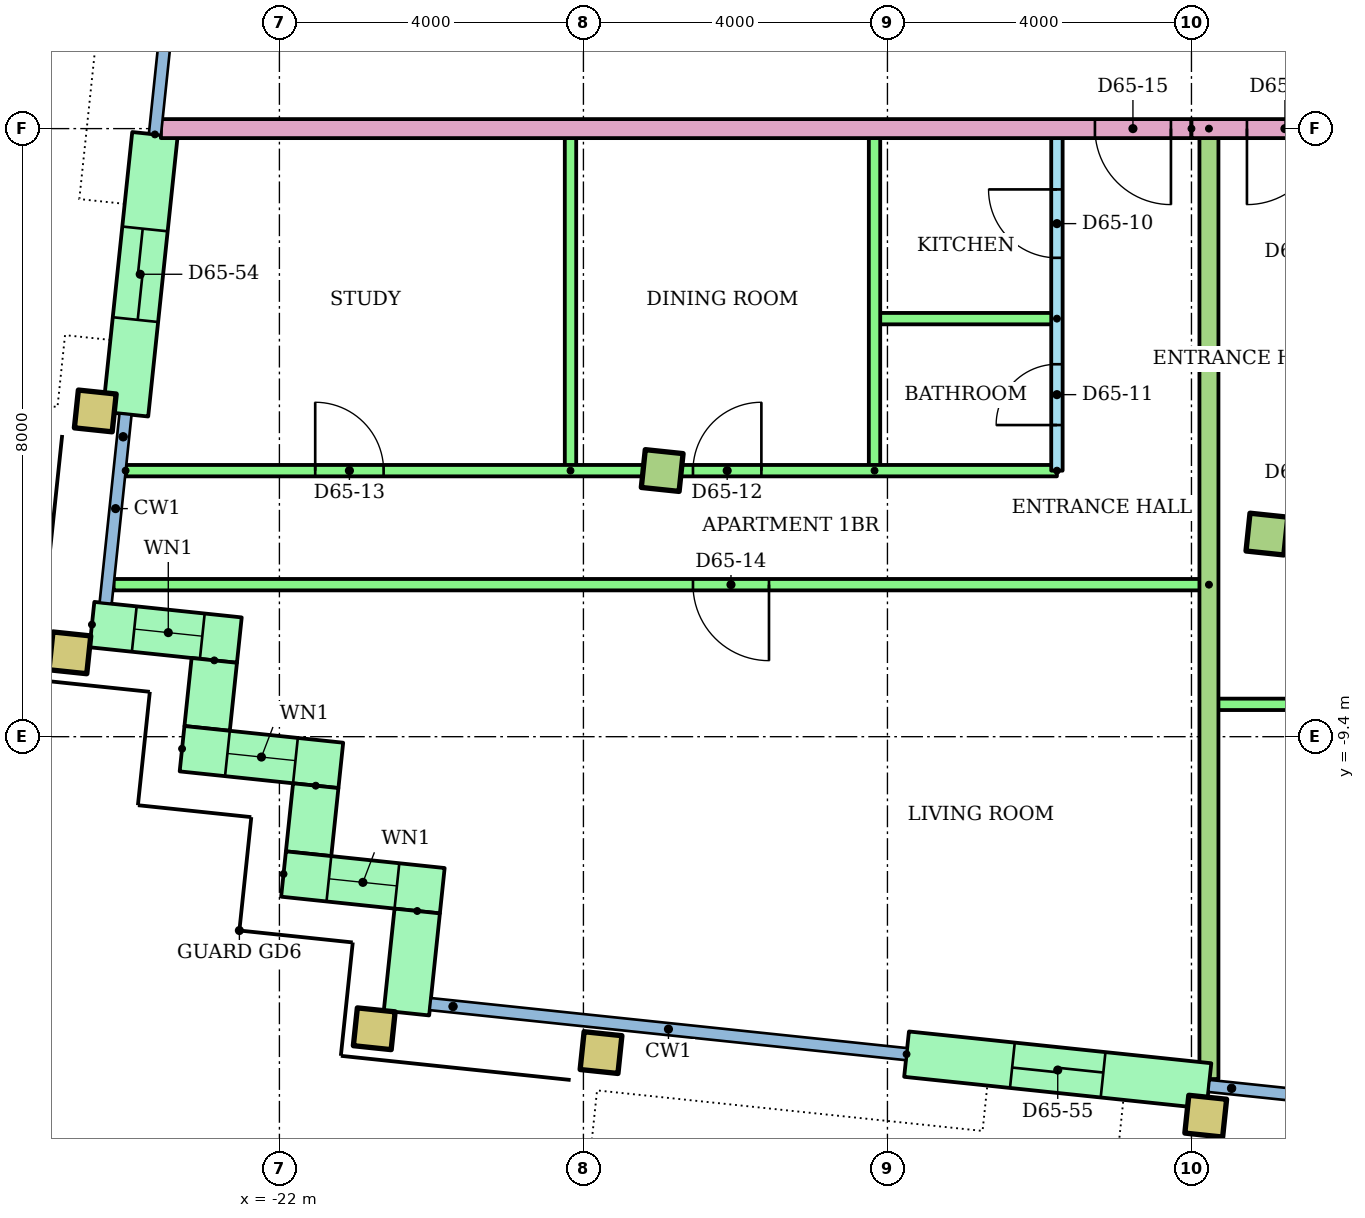
"""IFC4 building model, lengths in metres.
Left out: names, types, materials, properties, quantities, classifications, styles, units other than length and angle.
Written with IfcOpenShell. Run it as: python <this file> out.ifc"""

import sys

from ifc_helpers import new_model, si_unit, direction, frame, frame_2d, origin, origin_2d, place, context, subcontext, project, spatial, rectangle, hollow_rectangle, extrude, element, fill, save


model = new_model("IFC4")
c1 = context("Model", 3, precision=1e-05, world=origin(), true_north=direction((0.0, 1.0)))
c2 = subcontext(c1, "Body", "Model", "MODEL_VIEW")
j1 = project(units=[si_unit("LENGTHUNIT", "METRE"), si_unit("PLANEANGLEUNIT", "RADIAN")], contexts=[c1])
p1 = place(None, origin())
s1 = spatial("IfcSite", under=j1, at=p1, CompositionType="ELEMENT")
p2 = place(p1, origin())
s2 = spatial("IfcBuilding", under=s1, at=p2, CompositionType="ELEMENT")
p3 = place(p2, frame((0.0, 0.0, 253.1)))
s3 = spatial("IfcBuildingStorey", under=s2, at=p3, CompositionType="ELEMENT", Elevation=253.1)
for number, where, z_axis, x_axis in (
    (1, (-20.752, -13.243, 0.0), (0.0, 0.0, 1.0), (0.995, -0.105, 0.0)),
    (2, (-17.768, -13.556, 0.0), (0.0, 0.0, 1.0), (0.995, -0.105, 0.0)),
    (3, (-9.812, -14.392, 0.0), (0.0, 0.0, 1.0), (0.995, -0.105, 0.0)),
    (4, (-24.757, -8.297, 0.0), (0.0, 0.0, 1.0), (0.995, -0.105, 0.0)),
    (5, (-24.423, -5.115, 0.0), (0.0, 0.0, 1.0), (0.995, -0.105, 0.0)),
):
    element("IfcColumn", number, at=place(p3, frame(where, z_axis=z_axis, x_axis=x_axis)), inside=s3, PredefinedType="COLUMN", context=c2, shape_type="SweptSolid", body=[
        extrude(hollow_rectangle(XDim=0.5, YDim=0.5, WallThickness=0.025, at=origin_2d()), origin(), (0.0, 0.0, 1.0), 3.2),
    ])
for number, where, z_axis, x_axis in (
    (6, (-16.964, -5.898, 0.0), (0.0, 0.0, 1.0), (0.995, -0.105, 0.0)),
    (7, (-9.007, -6.735, 0.0), (0.0, 0.0, 1.0), (0.995, -0.105, 0.0)),
):
    element("IfcColumn", number, at=place(p3, frame(where, z_axis=z_axis, x_axis=x_axis)), inside=s3, PredefinedType="COLUMN", context=c2, shape_type="SweptSolid", body=[
        extrude(rectangle(XDim=0.5, YDim=0.5, at=origin_2d()), origin(), (0.0, 0.0, 1.0), 3.2),
    ])
p4 = place(p3, frame((-23.638, -1.476, 0.0), z_axis=(0.0, 0.0, 1.0), x_axis=(-0.104513052986, -0.994523514933, 0.0)))
e8 = element("IfcWall", 8, at=p4, inside=s3, PredefinedType="STANDARD", context=c2, shape_type="SweptSolid", body=[
    extrude(rectangle(XDim=3.7, YDim=0.6, at=frame_2d((1.85, 0.0))), origin(), (0.0, 0.0, 1.0), 2.92),
])
p5 = place(p4, frame((1.25, 0.0, 0.0)))
e9 = element("IfcOpeningElement", 9, at=p5, cuts=e8, PredefinedType="OPENING", context=c2, shape_type="SweptSolid", body=[
    extrude(rectangle(XDim=1.2, YDim=2.1, at=frame_2d((0.6, 1.05))), frame((0.0, 0.31, 0.0), z_axis=(0.0, -1.0, 0.0), x_axis=(1.0, 0.0, 0.0)), (0.0, 0.0, 1.0), 0.62),
])
p6 = place(p3, frame((-24.467, -7.925, 0.0), z_axis=(0.0, 0.0, 1.0), x_axis=(0.994521219184, -0.104534896528, 0.0)))
e10 = element("IfcWall", 10, at=p6, inside=s3, PredefinedType="STANDARD", context=c2, shape_type="SweptSolid", body=[
    extrude(rectangle(XDim=1.95, YDim=0.6, at=frame_2d((0.975, 0.0))), origin(), (0.0, 0.0, 1.0), 2.92),
])
p7 = place(p6, frame((0.56, 0.0, 0.9)))
e11 = element("IfcOpeningElement", 11, at=p7, cuts=e10, PredefinedType="OPENING", context=c2, shape_type="SweptSolid", body=[
    extrude(rectangle(XDim=0.9, YDim=1.5, at=frame_2d((0.45, 0.75))), frame((0.0, 0.31, 0.0), z_axis=(0.0, -1.0, 0.0), x_axis=(1.0, 0.0, 0.0)), (0.0, 0.0, 1.0), 0.62),
])
p8 = place(p3, frame((-22.857, -8.396, 0.0), z_axis=(0.0, 0.0, 1.0), x_axis=(-0.104444712852, -0.994530694326, 0.0)))
e12 = element("IfcWall", 12, at=p8, inside=s3, PredefinedType="STANDARD", context=c2, shape_type="SweptSolid", body=[
    extrude(rectangle(XDim=0.9, YDim=0.6, at=frame_2d((0.45, 0.0))), origin(), (0.0, 0.0, 1.0), 2.92),
])
p9 = place(p3, frame((-23.281, -9.558, 0.0), z_axis=(0.0, 0.0, 1.0), x_axis=(0.994523910136, -0.104509292252, 0.0)))
e13 = element("IfcWall", 13, at=p9, inside=s3, PredefinedType="STANDARD", context=c2, shape_type="SweptSolid", body=[
    extrude(rectangle(XDim=2.1, YDim=0.6, at=frame_2d((1.05, 0.0))), origin(), (0.0, 0.0, 1.0), 2.92),
])
p10 = place(p9, frame((0.6, 0.0, 0.9)))
e14 = element("IfcOpeningElement", 14, at=p10, cuts=e13, PredefinedType="OPENING", context=c2, shape_type="SweptSolid", body=[
    extrude(rectangle(XDim=0.9, YDim=1.5, at=frame_2d((0.45, 0.75))), frame((0.0, 0.31, 0.0), z_axis=(0.0, -1.0, 0.0), x_axis=(1.0, 0.0, 0.0)), (0.0, 0.0, 1.0), 0.62),
])
p11 = place(p3, frame((-21.522, -10.044, 0.0), z_axis=(0.0, 0.0, 1.0), x_axis=(-0.104416541099, -0.994533652495, 0.0)))
e15 = element("IfcWall", 15, at=p11, inside=s3, PredefinedType="STANDARD", context=c2, shape_type="SweptSolid", body=[
    extrude(rectangle(XDim=0.9, YDim=0.6, at=frame_2d((0.45, 0.0))), origin(), (0.0, 0.0, 1.0), 2.92),
])
p12 = place(p3, frame((-21.946, -11.207, 0.0), z_axis=(0.0, 0.0, 1.0), x_axis=(0.994511820899, -0.104624271047, 0.0)))
e16 = element("IfcWall", 16, at=p12, inside=s3, PredefinedType="STANDARD", context=c2, shape_type="SweptSolid", body=[
    extrude(rectangle(XDim=2.1, YDim=0.6, at=frame_2d((1.05, 0.0))), origin(), (0.0, 0.0, 1.0), 2.92),
])
p13 = place(p12, frame((0.6, 0.0, 0.9)))
e17 = element("IfcOpeningElement", 17, at=p13, cuts=e16, PredefinedType="OPENING", context=c2, shape_type="SweptSolid", body=[
    extrude(rectangle(XDim=0.9, YDim=1.5, at=frame_2d((0.45, 0.75))), frame((0.0, 0.31, 0.0), z_axis=(0.0, -1.0, 0.0), x_axis=(1.0, 0.0, 0.0)), (0.0, 0.0, 1.0), 0.62),
])
p14 = place(p3, frame((-20.187, -11.693, 0.0), z_axis=(0.0, 0.0, 1.0), x_axis=(-0.1043365026, -0.994542052517, 0.0)))
e18 = element("IfcWall", 18, at=p14, inside=s3, PredefinedType="STANDARD", context=c2, shape_type="SweptSolid", body=[
    extrude(rectangle(XDim=1.35, YDim=0.6, at=frame_2d((0.675, 0.0))), origin(), (0.0, 0.0, 1.0), 2.92),
])
p15 = place(p3, frame((-13.749, -13.576, 0.0), z_axis=(0.0, 0.0, 1.0), x_axis=(0.994519156568, -0.104554517933, 0.0)))
e19 = element("IfcWall", 19, at=p15, inside=s3, PredefinedType="STANDARD", context=c2, shape_type="SweptSolid", body=[
    extrude(rectangle(XDim=4.0, YDim=0.6, at=frame_2d((2.0, 0.0))), origin(), (0.0, 0.0, 1.0), 2.92),
])
p16 = place(p15, frame((1.4, 0.0, 0.0)))
e20 = element("IfcOpeningElement", 20, at=p16, cuts=e19, PredefinedType="OPENING", context=c2, shape_type="SweptSolid", body=[
    extrude(rectangle(XDim=1.2, YDim=2.1, at=frame_2d((0.6, 1.05))), frame((0.0, 0.31, 0.0), z_axis=(0.0, -1.0, 0.0), x_axis=(1.0, 0.0, 0.0)), (0.0, 0.0, 1.0), 0.62),
])
p17 = place(p3, frame((-11.77, -5.9, 0.0), z_axis=(0.0, 0.0, 1.0), x_axis=(0.0, 1.0, 0.0)))
e21 = element("IfcWall", 21, at=p17, inside=s3, PredefinedType="PARTITIONING", context=c2, shape_type="SweptSolid", body=[
    extrude(rectangle(XDim=4.5, YDim=0.15, at=frame_2d((2.25, 0.0))), origin(), (0.0, 0.0, 1.0), 2.4),
])
p18 = place(p17, frame((2.8, 0.0, 0.0)))
e22 = element("IfcOpeningElement", 22, at=p18, cuts=e21, PredefinedType="OPENING", context=c2, shape_type="SweptSolid", body=[
    extrude(rectangle(XDim=0.9, YDim=2.1, at=frame_2d((0.45, 1.05))), frame((0.0, 0.085, 0.0), z_axis=(0.0, -1.0, 0.0), x_axis=(1.0, 0.0, 0.0)), (0.0, 0.0, 1.0), 0.17),
])
p19 = place(p17, frame((0.6, 0.0, 0.0)))
e23 = element("IfcOpeningElement", 23, at=p19, cuts=e21, PredefinedType="OPENING", context=c2, shape_type="SweptSolid", body=[
    extrude(rectangle(XDim=0.8, YDim=2.1, at=frame_2d((0.4, 1.05))), frame((0.0, 0.085, 0.0), z_axis=(0.0, -1.0, 0.0), x_axis=(1.0, 0.0, 0.0)), (0.0, 0.0, 1.0), 0.17),
])
p20 = place(p3, frame((-11.77, -3.9, 0.0), z_axis=(0.0, 0.0, 1.0), x_axis=(-1.0, 0.0, 0.0)))
e24 = element("IfcWall", 24, at=p20, inside=s3, PredefinedType="PARTITIONING", context=c2, shape_type="SweptSolid", body=[
    extrude(rectangle(XDim=2.4, YDim=0.15, at=frame_2d((1.2, 0.0))), origin(), (0.0, 0.0, 1.0), 2.4),
])
for number, where, z_axis, x_axis in (
    (25, (-14.17, -5.9, 0.0), (0.0, 0.0, 1.0), (0.0, 1.0, 0.0)),
    (26, (-18.17, -5.9, 0.0), (0.0, 0.0, 1.0), (0.0, 1.0, 0.0)),
):
    element("IfcWall", number, at=place(p3, frame(where, z_axis=z_axis, x_axis=x_axis)), inside=s3, PredefinedType="PARTITIONING", context=c2, shape_type="SweptSolid", body=[
        extrude(rectangle(XDim=4.5, YDim=0.15, at=frame_2d((2.25, 0.0))), origin(), (0.0, 0.0, 1.0), 2.4),
    ])
p21 = place(p3, frame((-24.023, -5.9, 0.0)))
e27 = element("IfcWall", 27, at=p21, inside=s3, PredefinedType="PARTITIONING", context=c2, shape_type="SweptSolid", body=[
    extrude(rectangle(XDim=12.253, YDim=0.15, at=frame_2d((6.127, 0.0))), origin(), (0.0, 0.0, 1.0), 2.4),
])
p22 = place(p21, frame((7.465, 0.0, 0.0)))
e28 = element("IfcOpeningElement", 28, at=p22, cuts=e27, PredefinedType="OPENING", context=c2, shape_type="SweptSolid", body=[
    extrude(rectangle(XDim=0.9, YDim=2.1, at=frame_2d((0.45, 1.05))), frame((0.0, 0.085, 0.0), z_axis=(0.0, -1.0, 0.0), x_axis=(1.0, 0.0, 0.0)), (0.0, 0.0, 1.0), 0.17),
])
p23 = place(p21, frame((2.494, 0.0, 0.0)))
e29 = element("IfcOpeningElement", 29, at=p23, cuts=e27, PredefinedType="OPENING", context=c2, shape_type="SweptSolid", body=[
    extrude(rectangle(XDim=0.9, YDim=2.1, at=frame_2d((0.45, 1.05))), frame((0.0, 0.085, 0.0), z_axis=(0.0, -1.0, 0.0), x_axis=(1.0, 0.0, 0.0)), (0.0, 0.0, 1.0), 0.17),
])
p24 = place(p3, frame((-9.77, -7.4, 0.0), z_axis=(0.0, 0.0, 1.0), x_axis=(-1.0, 0.0, 0.0)))
e30 = element("IfcWall", 30, at=p24, inside=s3, PredefinedType="PARTITIONING", context=c2, shape_type="SweptSolid", body=[
    extrude(rectangle(XDim=14.411, YDim=0.15, at=frame_2d((7.206, 0.0))), origin(), (0.0, 0.0, 1.0), 2.4),
])
p25 = place(p24, frame((5.789, 0.0, 0.0)))
e31 = element("IfcOpeningElement", 31, at=p25, cuts=e30, PredefinedType="OPENING", context=c2, shape_type="SweptSolid", body=[
    extrude(rectangle(XDim=1.0, YDim=2.1, at=frame_2d((0.5, 1.05))), frame((0.0, 0.085, 0.0), z_axis=(0.0, -1.0, 0.0), x_axis=(1.0, 0.0, 0.0)), (0.0, 0.0, 1.0), 0.17),
])
p26 = place(p3, frame((14.098, -8.975, 0.0), z_axis=(0.0, 0.0, 1.0), x_axis=(-1.0, 0.0, 0.0)))
e32 = element("IfcWall", 32, at=p26, inside=s3, PredefinedType="PARTITIONING", context=c2, shape_type="SweptSolid", body=[
    extrude(rectangle(XDim=23.868, YDim=0.15, at=frame_2d((11.934, 0.0))), origin(), (0.0, 0.0, 1.0), 2.4),
])
p27 = place(p26, frame((21.429, 0.0, 0.0)))
e33 = element("IfcOpeningElement", 33, at=p27, cuts=e32, PredefinedType="OPENING", context=c2, shape_type="SweptSolid", body=[
    extrude(rectangle(XDim=0.9, YDim=2.1, at=frame_2d((0.45, 1.05))), frame((0.0, 0.085, 0.0), z_axis=(0.0, -1.0, 0.0), x_axis=(1.0, 0.0, 0.0)), (0.0, 0.0, 1.0), 0.17),
])
p28 = place(p26, frame((17.451, 0.0, 0.0)))
e34 = element("IfcOpeningElement", 34, at=p28, cuts=e32, PredefinedType="OPENING", context=c2, shape_type="SweptSolid", body=[
    extrude(rectangle(XDim=0.9, YDim=2.1, at=frame_2d((0.45, 1.05))), frame((0.0, 0.085, 0.0), z_axis=(0.0, -1.0, 0.0), x_axis=(1.0, 0.0, 0.0)), (0.0, 0.0, 1.0), 0.17),
])
p29 = place(p26, frame((12.252, 0.0, 0.0)))
e35 = element("IfcOpeningElement", 35, at=p29, cuts=e32, PredefinedType="OPENING", context=c2, shape_type="SweptSolid", body=[
    extrude(rectangle(XDim=0.9, YDim=2.1, at=frame_2d((0.45, 1.05))), frame((0.0, 0.085, 0.0), z_axis=(0.0, -1.0, 0.0), x_axis=(1.0, 0.0, 0.0)), (0.0, 0.0, 1.0), 0.17),
])
p30 = place(p26, frame((9.495, 0.0, 0.0)))
e36 = element("IfcOpeningElement", 36, at=p30, cuts=e32, PredefinedType="OPENING", context=c2, shape_type="SweptSolid", body=[
    extrude(rectangle(XDim=0.9, YDim=2.1, at=frame_2d((0.45, 1.05))), frame((0.0, 0.085, 0.0), z_axis=(0.0, -1.0, 0.0), x_axis=(1.0, 0.0, 0.0)), (0.0, 0.0, 1.0), 0.17),
])
p31 = place(p26, frame((3.478, 0.0, 0.0)))
e37 = element("IfcOpeningElement", 37, at=p31, cuts=e32, PredefinedType="OPENING", context=c2, shape_type="SweptSolid", body=[
    extrude(rectangle(XDim=1.0, YDim=2.1, at=frame_2d((0.5, 1.05))), frame((0.0, 0.085, 0.0), z_axis=(0.0, -1.0, 0.0), x_axis=(1.0, 0.0, 0.0)), (0.0, 0.0, 1.0), 0.17),
])
p32 = place(p3, frame((-9.77, -1.4, 0.0), z_axis=(0.0, 0.0, 1.0), x_axis=(0.0, -1.0, 0.0)))
e38 = element("IfcWall", 38, at=p32, inside=s3, PredefinedType="PARTITIONING", context=c2, shape_type="SweptSolid", body=[
    extrude(rectangle(XDim=12.504, YDim=0.25, at=frame_2d((6.252, 0.0))), origin(), (0.0, 0.0, 1.0), 2.4),
])
p33 = place(p3, frame((-10.0, -1.4, 0.0), z_axis=(0.0, 0.0, 1.0), x_axis=(-1.0, 0.0, 0.0)))
e39 = element("IfcWall", 39, at=p33, inside=s3, PredefinedType="PARTITIONING", context=c2, shape_type="SweptSolid", body=[
    extrude(rectangle(XDim=13.56, YDim=0.25, at=frame_2d((6.78, 0.0))), origin(), (0.0, 0.0, 1.0), 2.4),
])
p34 = place(p33, frame((0.27, 0.0, 0.0)))
e40 = element("IfcOpeningElement", 40, at=p34, cuts=e39, PredefinedType="OPENING", context=c2, shape_type="SweptSolid", body=[
    extrude(rectangle(XDim=1.0, YDim=2.1, at=frame_2d((0.5, 1.05))), frame((0.0, 0.135, 0.0), z_axis=(0.0, -1.0, 0.0), x_axis=(1.0, 0.0, 0.0)), (0.0, 0.0, 1.0), 0.27),
])
p35 = place(p3, frame((10.0, -1.4, 0.0), z_axis=(0.0, 0.0, 1.0), x_axis=(-1.0, 0.0, 0.0)))
e41 = element("IfcWall", 41, at=p35, inside=s3, PredefinedType="PARTITIONING", context=c2, shape_type="SweptSolid", body=[
    extrude(rectangle(XDim=20.0, YDim=0.25, at=frame_2d((10.0, 0.0))), origin(), (0.0, 0.0, 1.0), 2.4),
])
p36 = place(p35, frame((18.27, 0.0, 0.0)))
e42 = element("IfcOpeningElement", 42, at=p36, cuts=e41, PredefinedType="OPENING", context=c2, shape_type="SweptSolid", body=[
    extrude(rectangle(XDim=1.0, YDim=2.1, at=frame_2d((0.5, 1.05))), frame((0.0, 0.135, 0.0), z_axis=(0.0, -1.0, 0.0), x_axis=(1.0, 0.0, 0.0)), (0.0, 0.0, 1.0), 0.27),
])
p37 = place(p7, origin())
e43 = element("IfcWindow", 43, at=p37, inside=s3, PartitioningType="SINGLE_PANEL", PredefinedType="WINDOW", context=c2, shape_type="SweptSolid", body=[
    extrude(rectangle(XDim=0.9, YDim=1.5, at=frame_2d((0.45, 0.75))), frame((0.0, 0.03, 0.0), z_axis=(0.0, -1.0, 0.0), x_axis=(1.0, 0.0, 0.0)), (0.0, 0.0, 1.0), 0.06),
])
fill(e11, e43)
p38 = place(p10, origin())
e44 = element("IfcWindow", 44, at=p38, inside=s3, PartitioningType="SINGLE_PANEL", PredefinedType="WINDOW", context=c2, shape_type="SweptSolid", body=[
    extrude(rectangle(XDim=0.9, YDim=1.5, at=frame_2d((0.45, 0.75))), frame((0.0, 0.03, 0.0), z_axis=(0.0, -1.0, 0.0), x_axis=(1.0, 0.0, 0.0)), (0.0, 0.0, 1.0), 0.06),
])
fill(e14, e44)
p39 = place(p13, origin())
e45 = element("IfcWindow", 45, at=p39, inside=s3, PartitioningType="SINGLE_PANEL", PredefinedType="WINDOW", context=c2, shape_type="SweptSolid", body=[
    extrude(rectangle(XDim=0.9, YDim=1.5, at=frame_2d((0.45, 0.75))), frame((0.0, 0.03, 0.0), z_axis=(0.0, -1.0, 0.0), x_axis=(1.0, 0.0, 0.0)), (0.0, 0.0, 1.0), 0.06),
])
fill(e17, e45)
p40 = place(p18, origin())
e46 = element("IfcDoor", 46, at=p40, inside=s3, OperationType="SINGLE_SWING_RIGHT", PredefinedType="DOOR", context=c2, shape_type="SweptSolid", body=[
    extrude(rectangle(XDim=0.9, YDim=2.1, at=frame_2d((0.45, 1.05))), frame((0.0, 0.025, 0.0), z_axis=(0.0, -1.0, 0.0), x_axis=(1.0, 0.0, 0.0)), (0.0, 0.0, 1.0), 0.05),
])
fill(e22, e46)
p41 = place(p19, origin())
e47 = element("IfcDoor", 47, at=p41, inside=s3, OperationType="SINGLE_SWING_LEFT", PredefinedType="DOOR", context=c2, shape_type="SweptSolid", body=[
    extrude(rectangle(XDim=0.8, YDim=2.1, at=frame_2d((0.4, 1.05))), frame((0.0, 0.025, 0.0), z_axis=(0.0, -1.0, 0.0), x_axis=(1.0, 0.0, 0.0)), (0.0, 0.0, 1.0), 0.05),
])
fill(e23, e47)
p42 = place(p22, origin())
e48 = element("IfcDoor", 48, at=p42, inside=s3, OperationType="SINGLE_SWING_RIGHT", PredefinedType="DOOR", context=c2, shape_type="SweptSolid", body=[
    extrude(rectangle(XDim=0.9, YDim=2.1, at=frame_2d((0.45, 1.05))), frame((0.0, 0.025, 0.0), z_axis=(0.0, -1.0, 0.0), x_axis=(1.0, 0.0, 0.0)), (0.0, 0.0, 1.0), 0.05),
])
fill(e28, e48)
p43 = place(p23, origin())
e49 = element("IfcDoor", 49, at=p43, inside=s3, OperationType="SINGLE_SWING_LEFT", PredefinedType="DOOR", context=c2, shape_type="SweptSolid", body=[
    extrude(rectangle(XDim=0.9, YDim=2.1, at=frame_2d((0.45, 1.05))), frame((0.0, 0.025, 0.0), z_axis=(0.0, -1.0, 0.0), x_axis=(1.0, 0.0, 0.0)), (0.0, 0.0, 1.0), 0.05),
])
fill(e29, e49)
p44 = place(p25, origin())
e50 = element("IfcDoor", 50, at=p44, inside=s3, OperationType="SINGLE_SWING_LEFT", PredefinedType="DOOR", context=c2, shape_type="SweptSolid", body=[
    extrude(rectangle(XDim=1.0, YDim=2.1, at=frame_2d((0.5, 1.05))), frame((0.0, 0.025, 0.0), z_axis=(0.0, -1.0, 0.0), x_axis=(1.0, 0.0, 0.0)), (0.0, 0.0, 1.0), 0.05),
])
fill(e31, e50)
p45 = place(p34, origin())
e51 = element("IfcDoor", 51, at=p45, inside=s3, OperationType="SINGLE_SWING_LEFT", PredefinedType="DOOR", context=c2, shape_type="SweptSolid", body=[
    extrude(rectangle(XDim=1.0, YDim=2.1, at=frame_2d((0.5, 1.05))), frame((0.0, 0.025, 0.0), z_axis=(0.0, -1.0, 0.0), x_axis=(1.0, 0.0, 0.0)), (0.0, 0.0, 1.0), 0.05),
])
fill(e40, e51)
p46 = place(p36, origin())
e52 = element("IfcDoor", 52, at=p46, inside=s3, OperationType="SINGLE_SWING_RIGHT", PredefinedType="DOOR", context=c2, shape_type="SweptSolid", body=[
    extrude(rectangle(XDim=1.0, YDim=2.1, at=frame_2d((0.5, 1.05))), frame((0.0, 0.025, 0.0), z_axis=(0.0, -1.0, 0.0), x_axis=(1.0, 0.0, 0.0)), (0.0, 0.0, 1.0), 0.05),
])
fill(e42, e52)
p47 = place(p5, origin())
e53 = element("IfcDoor", 53, at=p47, inside=s3, OperationType="SLIDING_TO_LEFT", PredefinedType="DOOR", context=c2, shape_type="SweptSolid", body=[
    extrude(rectangle(XDim=1.2, YDim=2.1, at=frame_2d((0.6, 1.05))), frame((0.0, 0.025, 0.0), z_axis=(0.0, -1.0, 0.0), x_axis=(1.0, 0.0, 0.0)), (0.0, 0.0, 1.0), 0.05),
])
fill(e9, e53)
p48 = place(p16, origin())
e54 = element("IfcDoor", 54, at=p48, inside=s3, OperationType="SLIDING_TO_LEFT", PredefinedType="DOOR", context=c2, shape_type="SweptSolid", body=[
    extrude(rectangle(XDim=1.2, YDim=2.1, at=frame_2d((0.6, 1.05))), frame((0.0, 0.025, 0.0), z_axis=(0.0, -1.0, 0.0), x_axis=(1.0, 0.0, 0.0)), (0.0, 0.0, 1.0), 0.05),
])
fill(e20, e54)
save(model, sys.argv[1])
